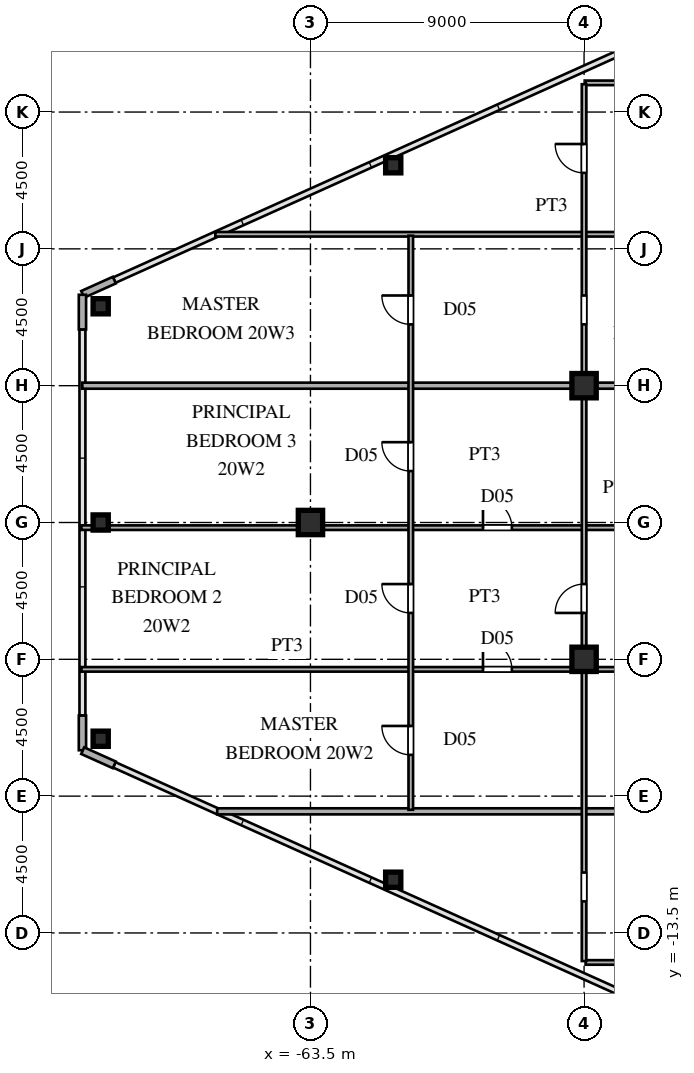
"""IFC4 building model, lengths in metres.
Left out: names, types, materials, properties, quantities, classifications, styles, units other than length and angle.
Written with IfcOpenShell. Run it as: python <this file> out.ifc"""

import sys

from ifc_helpers import new_model, si_unit, direction, frame, frame_2d, origin, origin_2d, place, context, subcontext, project, spatial, rectangle, hollow_rectangle, i_section, extrude, source, transform, mapped, element, fill, save


model = new_model("IFC4")
c1 = context("Model", 3, precision=1e-05, world=origin(), true_north=direction((0.0, 1.0)))
c2 = subcontext(c1, "Body", "Model", "MODEL_VIEW")
j1 = project(units=[si_unit("LENGTHUNIT", "METRE"), si_unit("PLANEANGLEUNIT", "RADIAN")], contexts=[c1])
p1 = place(None, origin())
s1 = spatial("IfcSite", under=j1, at=p1, CompositionType="ELEMENT")
p2 = place(p1, origin())
s2 = spatial("IfcBuilding", under=s1, at=p2, CompositionType="ELEMENT")
p3 = place(p2, frame((0.0, 0.0, 76.5)))
s3 = spatial("IfcBuildingStorey", under=s2, at=p3, CompositionType="ELEMENT", Elevation=76.5)
m1 = source(origin(), c2, "Body", "SweptSolid", [
    extrude(i_section(OverallWidth=0.8, OverallDepth=0.8, WebThickness=0.032, FlangeThickness=0.05, at=origin_2d()), origin(), (0.0, 0.0, 1.0), 3.6),
])
for number, where, z_axis, x_axis in (
    (1, (-54.5, -4.5, 0.0), (0.0, 0.0, 1.0), (1.0, 0.0, 0.0)),
    (2, (-54.5, 4.5, 0.0), (0.0, 0.0, 1.0), (1.0, 0.0, 0.0)),
    (3, (-63.5, 0.0, 0.0), (0.0, 0.0, 1.0), (1.0, 0.0, 0.0)),
):
    element("IfcColumn", number, at=place(p3, frame(where, z_axis=z_axis, x_axis=x_axis)), inside=s3, PredefinedType="COLUMN", context=c2, shape_type="MappedRepresentation", body=[
        mapped(m1, transform((0.0, 0.0, 0.0), scale=1.0)),
    ])
m2 = source(origin(), c2, "Body", "SweptSolid", [
    extrude(hollow_rectangle(XDim=0.5, YDim=0.5, WallThickness=0.02, at=origin_2d()), origin(), (0.0, 0.0, 1.0), 3.6),
])
for number, where, z_axis, x_axis in (
    (4, (-70.4, 7.112, 0.0), (0.0, 0.0, 1.0), (1.0, 0.0, 0.0)),
    (5, (-70.4, -7.112, 0.0), (0.0, 0.0, 1.0), (1.0, 0.0, 0.0)),
    (6, (-60.778, -11.749, 0.0), (0.0, 0.0, 1.0), (1.0, 0.0, 0.0)),
    (7, (-60.778, 11.749, 0.0), (0.0, 0.0, 1.0), (1.0, 0.0, 0.0)),
    (8, (-70.4, 0.0, 0.0), (0.0, 0.0, 1.0), (1.0, 0.0, 0.0)),
):
    element("IfcColumn", number, at=place(p3, frame(where, z_axis=z_axis, x_axis=x_axis)), inside=s3, PredefinedType="COLUMN", context=c2, shape_type="MappedRepresentation", body=[
        mapped(m2, transform((0.0, 0.0, 0.0), scale=1.0)),
    ])
for number, where, z_axis, x_axis in (
    (9, (-69.951, 7.972, 0.0), (0.0, 0.0, 1.0), (-0.912, -0.41, 0.0)),
    (10, (-71.0, 7.49, 0.0), (0.0, 0.0, 1.0), (0.0, -1.0, 0.0)),
    (11, (-71.0, -6.35, 0.0), (0.0, 0.0, 1.0), (0.0, -1.0, 0.0)),
    (12, (-70.991, -7.504, 0.0), (0.0, 0.0, 1.0), (0.912, -0.41, 0.0)),
):
    element("IfcWall", number, at=place(p3, frame(where, z_axis=z_axis, x_axis=x_axis)), inside=s3, PredefinedType="SOLIDWALL", context=c2, shape_type="SweptSolid", body=[
        extrude(rectangle(XDim=1.14, YDim=0.24, at=frame_2d((0.57, 0.0))), origin(), (0.0, 0.0, 1.0), 3.38),
    ])
p4 = place(p3, frame((-54.45, -14.47, 0.0), z_axis=(0.0, 0.0, 1.0), x_axis=(1.0, 0.0, 0.0)))
e13 = element("IfcWall", 13, at=p4, inside=s3, PredefinedType="PARTITIONING", context=c2, shape_type="SweptSolid", body=[
    extrude(rectangle(XDim=9.95, YDim=0.15, at=frame_2d((4.975, 0.0))), origin(), (0.0, 0.0, 1.0), 3.38),
])
p5 = place(p4, frame((4.5, 0.0, 0.0)))
e14 = element("IfcOpeningElement", 14, at=p5, cuts=e13, PredefinedType="OPENING", context=c2, shape_type="SweptSolid", body=[
    extrude(rectangle(XDim=0.95, YDim=2.15, at=frame_2d((0.475, 1.075))), frame((0.0, 0.085, 0.0), z_axis=(0.0, -1.0, 0.0), x_axis=(1.0, 0.0, 0.0)), (0.0, 0.0, 1.0), 0.17),
])
p6 = place(p3, frame((-66.568, -9.5, 0.0), z_axis=(0.0, 0.0, 1.0), x_axis=(1.0, 0.0, 0.0)))
e15 = element("IfcWall", 15, at=p6, inside=s3, PredefinedType="PARTITIONING", context=c2, shape_type="SweptSolid", body=[
    extrude(rectangle(XDim=28.188, YDim=0.2, at=frame_2d((14.094, 0.0))), origin(), (0.0, 0.0, 1.0), 3.38),
])
p7 = place(p3, frame((-71.035, -4.83, 0.0), z_axis=(0.0, 0.0, 1.0), x_axis=(1.0, 0.0, 0.0)))
e16 = element("IfcWall", 16, at=p7, inside=s3, PredefinedType="PARTITIONING", context=c2, shape_type="SweptSolid", body=[
    extrude(rectangle(XDim=26.535, YDim=0.15, at=frame_2d((13.268, 0.0))), origin(), (0.0, 0.0, 1.0), 3.38),
])
p8 = place(p7, frame((21.085, 0.0, 0.0)))
e17 = element("IfcOpeningElement", 17, at=p8, cuts=e16, PredefinedType="OPENING", context=c2, shape_type="SweptSolid", body=[
    extrude(rectangle(XDim=0.95, YDim=2.15, at=frame_2d((0.475, 1.075))), frame((0.0, 0.085, 0.0), z_axis=(0.0, -1.0, 0.0), x_axis=(1.0, 0.0, 0.0)), (0.0, 0.0, 1.0), 0.17),
])
p9 = place(p7, frame((13.21, 0.0, 0.0)))
e18 = element("IfcOpeningElement", 18, at=p9, cuts=e16, PredefinedType="OPENING", context=c2, shape_type="SweptSolid", body=[
    extrude(rectangle(XDim=0.95, YDim=2.15, at=frame_2d((0.475, 1.075))), frame((0.0, 0.085, 0.0), z_axis=(0.0, -1.0, 0.0), x_axis=(1.0, 0.0, 0.0)), (0.0, 0.0, 1.0), 0.17),
])
p10 = place(p3, frame((-71.035, -0.17, 0.0), z_axis=(0.0, 0.0, 1.0), x_axis=(1.0, 0.0, 0.0)))
e19 = element("IfcWall", 19, at=p10, inside=s3, PredefinedType="PARTITIONING", context=c2, shape_type="SweptSolid", body=[
    extrude(rectangle(XDim=26.535, YDim=0.15, at=frame_2d((13.268, 0.0))), origin(), (0.0, 0.0, 1.0), 3.38),
])
p11 = place(p10, frame((21.085, 0.0, 0.0)))
e20 = element("IfcOpeningElement", 20, at=p11, cuts=e19, PredefinedType="OPENING", context=c2, shape_type="SweptSolid", body=[
    extrude(rectangle(XDim=0.95, YDim=2.15, at=frame_2d((0.475, 1.075))), frame((0.0, 0.085, 0.0), z_axis=(0.0, -1.0, 0.0), x_axis=(1.0, 0.0, 0.0)), (0.0, 0.0, 1.0), 0.17),
])
p12 = place(p10, frame((13.21, 0.0, 0.0)))
e21 = element("IfcOpeningElement", 21, at=p12, cuts=e19, PredefinedType="OPENING", context=c2, shape_type="SweptSolid", body=[
    extrude(rectangle(XDim=0.95, YDim=2.15, at=frame_2d((0.475, 1.075))), frame((0.0, 0.085, 0.0), z_axis=(0.0, -1.0, 0.0), x_axis=(1.0, 0.0, 0.0)), (0.0, 0.0, 1.0), 0.17),
])
p13 = place(p3, frame((-71.005, 4.5, 0.0), z_axis=(0.0, 0.0, 1.0), x_axis=(1.0, 0.0, 0.0)))
e22 = element("IfcWall", 22, at=p13, inside=s3, PredefinedType="PARTITIONING", context=c2, shape_type="SweptSolid", body=[
    extrude(rectangle(XDim=16.485, YDim=0.2, at=frame_2d((8.242, 0.0))), origin(), (0.0, 0.0, 1.0), 3.38),
])
p14 = place(p3, frame((-54.52, 4.5, 0.0), z_axis=(0.0, 0.0, 1.0), x_axis=(1.0, 0.0, 0.0)))
e23 = element("IfcWall", 23, at=p14, inside=s3, PredefinedType="PARTITIONING", context=c2, shape_type="SweptSolid", body=[
    extrude(rectangle(XDim=16.14, YDim=0.2, at=frame_2d((8.07, 0.0))), origin(), (0.0, 0.0, 1.0), 2.68),
])
p15 = place(p3, frame((-66.629, 9.48, 0.0), z_axis=(0.0, 0.0, 1.0), x_axis=(1.0, 0.0, 0.0)))
e24 = element("IfcWall", 24, at=p15, inside=s3, PredefinedType="PARTITIONING", context=c2, shape_type="SweptSolid", body=[
    extrude(rectangle(XDim=22.129, YDim=0.15, at=frame_2d((11.064, 0.0))), origin(), (0.0, 0.0, 1.0), 3.38),
])
p16 = place(p15, frame((16.679, 0.0, 0.0)))
e25 = element("IfcOpeningElement", 25, at=p16, cuts=e24, PredefinedType="OPENING", context=c2, shape_type="SweptSolid", body=[
    extrude(rectangle(XDim=0.95, YDim=2.15, at=frame_2d((0.475, 1.075))), frame((0.0, 0.085, 0.0), z_axis=(0.0, -1.0, 0.0), x_axis=(1.0, 0.0, 0.0)), (0.0, 0.0, 1.0), 0.17),
])
p17 = place(p3, frame((-54.45, 14.46, 0.0), z_axis=(0.0, 0.0, 1.0), x_axis=(1.0, 0.0, 0.0)))
e26 = element("IfcWall", 26, at=p17, inside=s3, PredefinedType="PARTITIONING", context=c2, shape_type="SweptSolid", body=[
    extrude(rectangle(XDim=9.95, YDim=0.15, at=frame_2d((4.975, 0.0))), origin(), (0.0, 0.0, 1.0), 3.38),
])
p18 = place(p17, frame((4.5, 0.0, 0.0)))
e27 = element("IfcOpeningElement", 27, at=p18, cuts=e26, PredefinedType="OPENING", context=c2, shape_type="SweptSolid", body=[
    extrude(rectangle(XDim=0.95, YDim=2.15, at=frame_2d((0.475, 1.075))), frame((0.0, 0.085, 0.0), z_axis=(0.0, -1.0, 0.0), x_axis=(1.0, 0.0, 0.0)), (0.0, 0.0, 1.0), 0.17),
])
p19 = place(p3, frame((-60.2, -9.45, 0.0), z_axis=(0.0, 0.0, 1.0), x_axis=(0.0, 1.0, 0.0)))
e28 = element("IfcWall", 28, at=p19, inside=s3, PredefinedType="PARTITIONING", context=c2, shape_type="SweptSolid", body=[
    extrude(rectangle(XDim=18.883, YDim=0.15, at=frame_2d((9.441, 0.0))), origin(), (0.0, 0.0, 1.0), 3.38),
])
p20 = place(p19, frame((1.808, 0.0, 0.0)))
e29 = element("IfcOpeningElement", 29, at=p20, cuts=e28, PredefinedType="OPENING", context=c2, shape_type="SweptSolid", body=[
    extrude(rectangle(XDim=0.95, YDim=2.15, at=frame_2d((0.475, 1.075))), frame((0.0, 0.085, 0.0), z_axis=(0.0, -1.0, 0.0), x_axis=(1.0, 0.0, 0.0)), (0.0, 0.0, 1.0), 0.17),
])
p21 = place(p19, frame((6.475, 0.0, 0.0)))
e30 = element("IfcOpeningElement", 30, at=p21, cuts=e28, PredefinedType="OPENING", context=c2, shape_type="SweptSolid", body=[
    extrude(rectangle(XDim=0.95, YDim=2.15, at=frame_2d((0.475, 1.075))), frame((0.0, 0.085, 0.0), z_axis=(0.0, -1.0, 0.0), x_axis=(1.0, 0.0, 0.0)), (0.0, 0.0, 1.0), 0.17),
])
p22 = place(p19, frame((11.142, 0.0, 0.0)))
e31 = element("IfcOpeningElement", 31, at=p22, cuts=e28, PredefinedType="OPENING", context=c2, shape_type="SweptSolid", body=[
    extrude(rectangle(XDim=0.95, YDim=2.15, at=frame_2d((0.475, 1.075))), frame((0.0, 0.085, 0.0), z_axis=(0.0, -1.0, 0.0), x_axis=(1.0, 0.0, 0.0)), (0.0, 0.0, 1.0), 0.17),
])
p23 = place(p19, frame((15.966, 0.0, 0.0)))
e32 = element("IfcOpeningElement", 32, at=p23, cuts=e28, PredefinedType="OPENING", context=c2, shape_type="SweptSolid", body=[
    extrude(rectangle(XDim=0.95, YDim=2.15, at=frame_2d((0.475, 1.075))), frame((0.0, 0.085, 0.0), z_axis=(0.0, -1.0, 0.0), x_axis=(1.0, 0.0, 0.0)), (0.0, 0.0, 1.0), 0.17),
])
p24 = place(p3, frame((-54.5, -14.424, 0.0), z_axis=(0.0, 0.0, 1.0), x_axis=(0.0, 1.0, 0.0)))
e33 = element("IfcWall", 33, at=p24, inside=s3, PredefinedType="PARTITIONING", context=c2, shape_type="SweptSolid", body=[
    extrude(rectangle(XDim=28.839, YDim=0.15, at=frame_2d((14.419, 0.0))), origin(), (0.0, 0.0, 1.0), 2.68),
])
p25 = place(p24, frame((1.962, 0.0, 0.0)))
e34 = element("IfcOpeningElement", 34, at=p25, cuts=e33, PredefinedType="OPENING", context=c2, shape_type="SweptSolid", body=[
    extrude(rectangle(XDim=0.95, YDim=2.15, at=frame_2d((0.475, 1.075))), frame((0.0, 0.085, 0.0), z_axis=(0.0, -1.0, 0.0), x_axis=(1.0, 0.0, 0.0)), (0.0, 0.0, 1.0), 0.17),
])
p26 = place(p24, frame((11.449, 0.0, 0.0)))
e35 = element("IfcOpeningElement", 35, at=p26, cuts=e33, PredefinedType="OPENING", context=c2, shape_type="SweptSolid", body=[
    extrude(rectangle(XDim=0.95, YDim=2.15, at=frame_2d((0.475, 1.075))), frame((0.0, 0.085, 0.0), z_axis=(0.0, -1.0, 0.0), x_axis=(1.0, 0.0, 0.0)), (0.0, 0.0, 1.0), 0.17),
])
p27 = place(p24, frame((25.923, 0.0, 0.0)))
e36 = element("IfcOpeningElement", 36, at=p27, cuts=e33, PredefinedType="OPENING", context=c2, shape_type="SweptSolid", body=[
    extrude(rectangle(XDim=0.95, YDim=2.15, at=frame_2d((0.475, 1.075))), frame((0.0, 0.085, 0.0), z_axis=(0.0, -1.0, 0.0), x_axis=(1.0, 0.0, 0.0)), (0.0, 0.0, 1.0), 0.17),
])
p28 = place(p24, frame((20.94, 0.0, 0.0)))
e37 = element("IfcOpeningElement", 37, at=p28, cuts=e33, PredefinedType="OPENING", context=c2, shape_type="SweptSolid", body=[
    extrude(rectangle(XDim=0.95, YDim=2.15, at=frame_2d((0.475, 1.075))), frame((0.0, 0.085, 0.0), z_axis=(0.0, -1.0, 0.0), x_axis=(1.0, 0.0, 0.0)), (0.0, 0.0, 1.0), 0.17),
])
m3 = source(origin(), c2, "Body", "SweptSolid", [
    extrude(rectangle(XDim=0.95, YDim=2.15, at=frame_2d((0.475, 1.075))), frame((0.0, 0.025, 0.0), z_axis=(0.0, -1.0, 0.0), x_axis=(1.0, 0.0, 0.0)), (0.0, 0.0, 1.0), 0.05),
])
p29 = place(p9, origin())
e38 = element("IfcDoor", 38, at=p29, inside=s3, OperationType="SINGLE_SWING_LEFT", PredefinedType="DOOR", context=c2, shape_type="MappedRepresentation", body=[
    mapped(m3, transform((0.0, 0.0, 0.0), scale=1.0)),
])
fill(e18, e38)
p30 = place(p12, origin())
e39 = element("IfcDoor", 39, at=p30, inside=s3, OperationType="SINGLE_SWING_LEFT", PredefinedType="DOOR", context=c2, shape_type="MappedRepresentation", body=[
    mapped(m3, transform((0.0, 0.0, 0.0), scale=1.0)),
])
fill(e21, e39)
p31 = place(p20, origin())
e40 = element("IfcDoor", 40, at=p31, inside=s3, OperationType="SINGLE_SWING_RIGHT", PredefinedType="DOOR", context=c2, shape_type="MappedRepresentation", body=[
    mapped(m3, transform((0.0, 0.0, 0.0), scale=1.0)),
])
fill(e29, e40)
p32 = place(p21, origin())
e41 = element("IfcDoor", 41, at=p32, inside=s3, OperationType="SINGLE_SWING_RIGHT", PredefinedType="DOOR", context=c2, shape_type="MappedRepresentation", body=[
    mapped(m3, transform((0.0, 0.0, 0.0), scale=1.0)),
])
fill(e30, e41)
p33 = place(p22, origin())
e42 = element("IfcDoor", 42, at=p33, inside=s3, OperationType="SINGLE_SWING_RIGHT", PredefinedType="DOOR", context=c2, shape_type="MappedRepresentation", body=[
    mapped(m3, transform((0.0, 0.0, 0.0), scale=1.0)),
])
fill(e31, e42)
p34 = place(p23, origin())
e43 = element("IfcDoor", 43, at=p34, inside=s3, OperationType="SINGLE_SWING_RIGHT", PredefinedType="DOOR", context=c2, shape_type="MappedRepresentation", body=[
    mapped(m3, transform((0.0, 0.0, 0.0), scale=1.0)),
])
fill(e32, e43)
p35 = place(p26, origin())
e44 = element("IfcDoor", 44, at=p35, inside=s3, OperationType="SINGLE_SWING_LEFT", PredefinedType="DOOR", context=c2, shape_type="MappedRepresentation", body=[
    mapped(m3, transform((0.0, 0.0, 0.0), scale=1.0)),
])
fill(e35, e44)
p36 = place(p27, origin())
e45 = element("IfcDoor", 45, at=p36, inside=s3, OperationType="SINGLE_SWING_RIGHT", PredefinedType="DOOR", context=c2, shape_type="MappedRepresentation", body=[
    mapped(m3, transform((0.0, 0.0, 0.0), scale=1.0)),
])
fill(e36, e45)
save(model, sys.argv[1])
